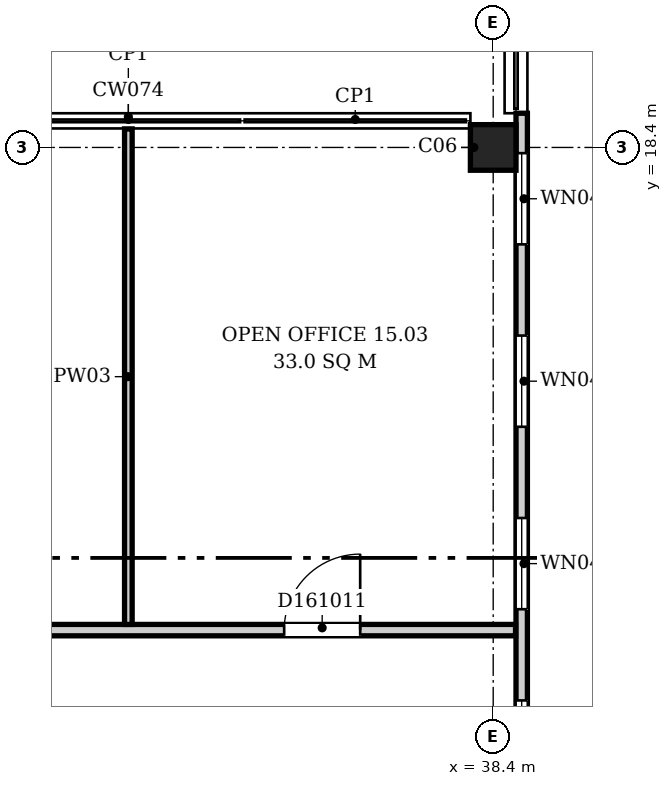
"""IFC4 building model, lengths in metres.
Left out: names, types, materials, properties, quantities, classifications, styles, units other than length and angle.
Written with IfcOpenShell. Run it as: python <this file> out.ifc"""

import sys

from ifc_helpers import new_model, si_unit, direction, frame, frame_2d, origin, origin_2d, place, context, subcontext, project, spatial, rectangle, extrude, element, fill, save


model = new_model("IFC4")
c1 = context("Model", 3, precision=1e-05, world=origin(), true_north=direction((0.0, 1.0)))
c2 = subcontext(c1, "Body", "Model", "MODEL_VIEW")
j1 = project(units=[si_unit("LENGTHUNIT", "METRE"), si_unit("PLANEANGLEUNIT", "RADIAN")], contexts=[c1])
p1 = place(None, origin())
s1 = spatial("IfcSite", under=j1, at=p1, CompositionType="ELEMENT")
p2 = place(p1, origin())
s2 = spatial("IfcBuilding", under=s1, at=p2, CompositionType="ELEMENT")
p3 = place(p2, frame((0.0, 0.0, 73.9)))
s3 = spatial("IfcBuildingStorey", under=s2, at=p3, CompositionType="ELEMENT", Elevation=73.9)
p4 = place(p3, frame((38.4, 18.4, 0.0), z_axis=(0.0, 0.0, 1.0), x_axis=(1.0, 0.0, 0.0)))
e1 = element("IfcColumn", 1, at=p4, inside=s3, PredefinedType="COLUMN", context=c2, shape_type="SweptSolid", body=[
    extrude(rectangle(XDim=0.6, YDim=0.6, at=origin_2d()), origin(), (0.0, 0.0, 1.0), 4.2),
])
p5 = place(p3, frame((38.775, -0.2, 0.0), z_axis=(0.0, 0.0, 1.0), x_axis=(0.0, 1.0, 0.0)))
e2 = element("IfcWall", 2, at=p5, inside=s3, PredefinedType="ELEMENTEDWALL", context=c2, shape_type="SweptSolid", body=[
    extrude(rectangle(XDim=19.05, YDim=0.15, at=frame_2d((9.525, 0.0))), origin(), (0.0, 0.0, 1.0), 3.9),
])
p6 = place(p5, frame((0.525, 0.0, 0.9)))
e3 = element("IfcOpeningElement", 3, at=p6, cuts=e2, PredefinedType="OPENING", context=c2, shape_type="SweptSolid", body=[
    extrude(rectangle(XDim=1.2, YDim=2.6, at=frame_2d((0.6, 1.3))), frame((0.0, 0.085, 0.0), z_axis=(0.0, -1.0, 0.0), x_axis=(1.0, 0.0, 0.0)), (0.0, 0.0, 1.0), 0.17),
])
p7 = place(p5, frame((2.925, 0.0, 0.9)))
e4 = element("IfcOpeningElement", 4, at=p7, cuts=e2, PredefinedType="OPENING", context=c2, shape_type="SweptSolid", body=[
    extrude(rectangle(XDim=1.2, YDim=2.6, at=frame_2d((0.6, 1.3))), frame((0.0, 0.085, 0.0), z_axis=(0.0, -1.0, 0.0), x_axis=(1.0, 0.0, 0.0)), (0.0, 0.0, 1.0), 0.17),
])
p8 = place(p5, frame((5.325, 0.0, 0.9)))
e5 = element("IfcOpeningElement", 5, at=p8, cuts=e2, PredefinedType="OPENING", context=c2, shape_type="SweptSolid", body=[
    extrude(rectangle(XDim=1.2, YDim=2.6, at=frame_2d((0.6, 1.3))), frame((0.0, 0.085, 0.0), z_axis=(0.0, -1.0, 0.0), x_axis=(1.0, 0.0, 0.0)), (0.0, 0.0, 1.0), 0.17),
])
p9 = place(p5, frame((7.725, 0.0, 0.9)))
e6 = element("IfcOpeningElement", 6, at=p9, cuts=e2, PredefinedType="OPENING", context=c2, shape_type="SweptSolid", body=[
    extrude(rectangle(XDim=1.2, YDim=2.6, at=frame_2d((0.6, 1.3))), frame((0.0, 0.085, 0.0), z_axis=(0.0, -1.0, 0.0), x_axis=(1.0, 0.0, 0.0)), (0.0, 0.0, 1.0), 0.17),
])
p10 = place(p5, frame((10.125, 0.0, 0.9)))
e7 = element("IfcOpeningElement", 7, at=p10, cuts=e2, PredefinedType="OPENING", context=c2, shape_type="SweptSolid", body=[
    extrude(rectangle(XDim=1.2, YDim=2.6, at=frame_2d((0.6, 1.3))), frame((0.0, 0.085, 0.0), z_axis=(0.0, -1.0, 0.0), x_axis=(1.0, 0.0, 0.0)), (0.0, 0.0, 1.0), 0.17),
])
p11 = place(p5, frame((12.525, 0.0, 0.9)))
e8 = element("IfcOpeningElement", 8, at=p11, cuts=e2, PredefinedType="OPENING", context=c2, shape_type="SweptSolid", body=[
    extrude(rectangle(XDim=1.2, YDim=2.6, at=frame_2d((0.6, 1.3))), frame((0.0, 0.085, 0.0), z_axis=(0.0, -1.0, 0.0), x_axis=(1.0, 0.0, 0.0)), (0.0, 0.0, 1.0), 0.17),
])
p12 = place(p5, frame((14.925, 0.0, 0.9)))
e9 = element("IfcOpeningElement", 9, at=p12, cuts=e2, PredefinedType="OPENING", context=c2, shape_type="SweptSolid", body=[
    extrude(rectangle(XDim=1.2, YDim=2.6, at=frame_2d((0.6, 1.3))), frame((0.0, 0.085, 0.0), z_axis=(0.0, -1.0, 0.0), x_axis=(1.0, 0.0, 0.0)), (0.0, 0.0, 1.0), 0.17),
])
p13 = place(p5, frame((17.325, 0.0, 0.9)))
e10 = element("IfcOpeningElement", 10, at=p13, cuts=e2, PredefinedType="OPENING", context=c2, shape_type="SweptSolid", body=[
    extrude(rectangle(XDim=1.2, YDim=2.6, at=frame_2d((0.6, 1.3))), frame((0.0, 0.085, 0.0), z_axis=(0.0, -1.0, 0.0), x_axis=(1.0, 0.0, 0.0)), (0.0, 0.0, 1.0), 0.17),
])
p14 = place(p3, frame((27.206, 12.05, 0.0), z_axis=(0.0, 0.0, 1.0), x_axis=(1.0, 0.0, 0.0)))
e11 = element("IfcWall", 11, at=p14, inside=s3, PredefinedType="PARTITIONING", context=c2, shape_type="SweptSolid", body=[
    extrude(rectangle(XDim=11.488, YDim=0.15, at=frame_2d((5.744, 0.0))), origin(), (0.0, 0.0, 1.0), 3.9),
])
p15 = place(p14, frame((2.694, 0.0, 0.0)))
e12 = element("IfcOpeningElement", 12, at=p15, cuts=e11, PredefinedType="OPENING", context=c2, shape_type="SweptSolid", body=[
    extrude(rectangle(XDim=1.0, YDim=2.1, at=frame_2d((0.5, 1.05))), frame((0.0, 0.085, 0.0), z_axis=(0.0, -1.0, 0.0), x_axis=(1.0, 0.0, 0.0)), (0.0, 0.0, 1.0), 0.17),
])
p16 = place(p14, frame((8.444, 0.0, 0.0)))
e13 = element("IfcOpeningElement", 13, at=p16, cuts=e11, PredefinedType="OPENING", context=c2, shape_type="SweptSolid", body=[
    extrude(rectangle(XDim=1.0, YDim=2.1, at=frame_2d((0.5, 1.05))), frame((0.0, 0.085, 0.0), z_axis=(0.0, -1.0, 0.0), x_axis=(1.0, 0.0, 0.0)), (0.0, 0.0, 1.0), 0.17),
])
p17 = place(p3, frame((33.6, 12.125, 0.0), z_axis=(0.0, 0.0, 1.0), x_axis=(0.0, 1.0, 0.0)))
e14 = element("IfcWall", 14, at=p17, inside=s3, PredefinedType="PARTITIONING", context=c2, shape_type="SweptSolid", body=[
    extrude(rectangle(XDim=6.519, YDim=0.1, at=frame_2d((3.26, 0.0))), origin(), (0.0, 0.0, 1.0), 3.9),
])
p18 = place(p10, origin())
e15 = element("IfcWindow", 15, at=p18, inside=s3, PartitioningType="SINGLE_PANEL", PredefinedType="WINDOW", context=c2, shape_type="SweptSolid", body=[
    extrude(rectangle(XDim=1.2, YDim=2.6, at=frame_2d((0.6, 1.3))), frame((0.0, 0.03, 0.0), z_axis=(0.0, -1.0, 0.0), x_axis=(1.0, 0.0, 0.0)), (0.0, 0.0, 1.0), 0.06),
])
fill(e7, e15)
p19 = place(p11, origin())
e16 = element("IfcWindow", 16, at=p19, inside=s3, PartitioningType="SINGLE_PANEL", PredefinedType="WINDOW", context=c2, shape_type="SweptSolid", body=[
    extrude(rectangle(XDim=1.2, YDim=2.6, at=frame_2d((0.6, 1.3))), frame((0.0, 0.03, 0.0), z_axis=(0.0, -1.0, 0.0), x_axis=(1.0, 0.0, 0.0)), (0.0, 0.0, 1.0), 0.06),
])
fill(e8, e16)
p20 = place(p12, origin())
e17 = element("IfcWindow", 17, at=p20, inside=s3, PartitioningType="SINGLE_PANEL", PredefinedType="WINDOW", context=c2, shape_type="SweptSolid", body=[
    extrude(rectangle(XDim=1.2, YDim=2.6, at=frame_2d((0.6, 1.3))), frame((0.0, 0.03, 0.0), z_axis=(0.0, -1.0, 0.0), x_axis=(1.0, 0.0, 0.0)), (0.0, 0.0, 1.0), 0.06),
])
fill(e9, e17)
p21 = place(p13, origin())
e18 = element("IfcWindow", 18, at=p21, inside=s3, PartitioningType="SINGLE_PANEL", PredefinedType="WINDOW", context=c2, shape_type="SweptSolid", body=[
    extrude(rectangle(XDim=1.2, YDim=2.6, at=frame_2d((0.6, 1.3))), frame((0.0, 0.03, 0.0), z_axis=(0.0, -1.0, 0.0), x_axis=(1.0, 0.0, 0.0)), (0.0, 0.0, 1.0), 0.06),
])
fill(e10, e18)
p22 = place(p16, origin())
e19 = element("IfcDoor", 19, at=p22, inside=s3, OperationType="SINGLE_SWING_RIGHT", PredefinedType="DOOR", context=c2, shape_type="SweptSolid", body=[
    extrude(rectangle(XDim=1.0, YDim=2.1, at=frame_2d((0.5, 1.05))), frame((0.0, 0.025, 0.0), z_axis=(0.0, -1.0, 0.0), x_axis=(1.0, 0.0, 0.0)), (0.0, 0.0, 1.0), 0.05),
])
fill(e13, e19)
save(model, sys.argv[1])
